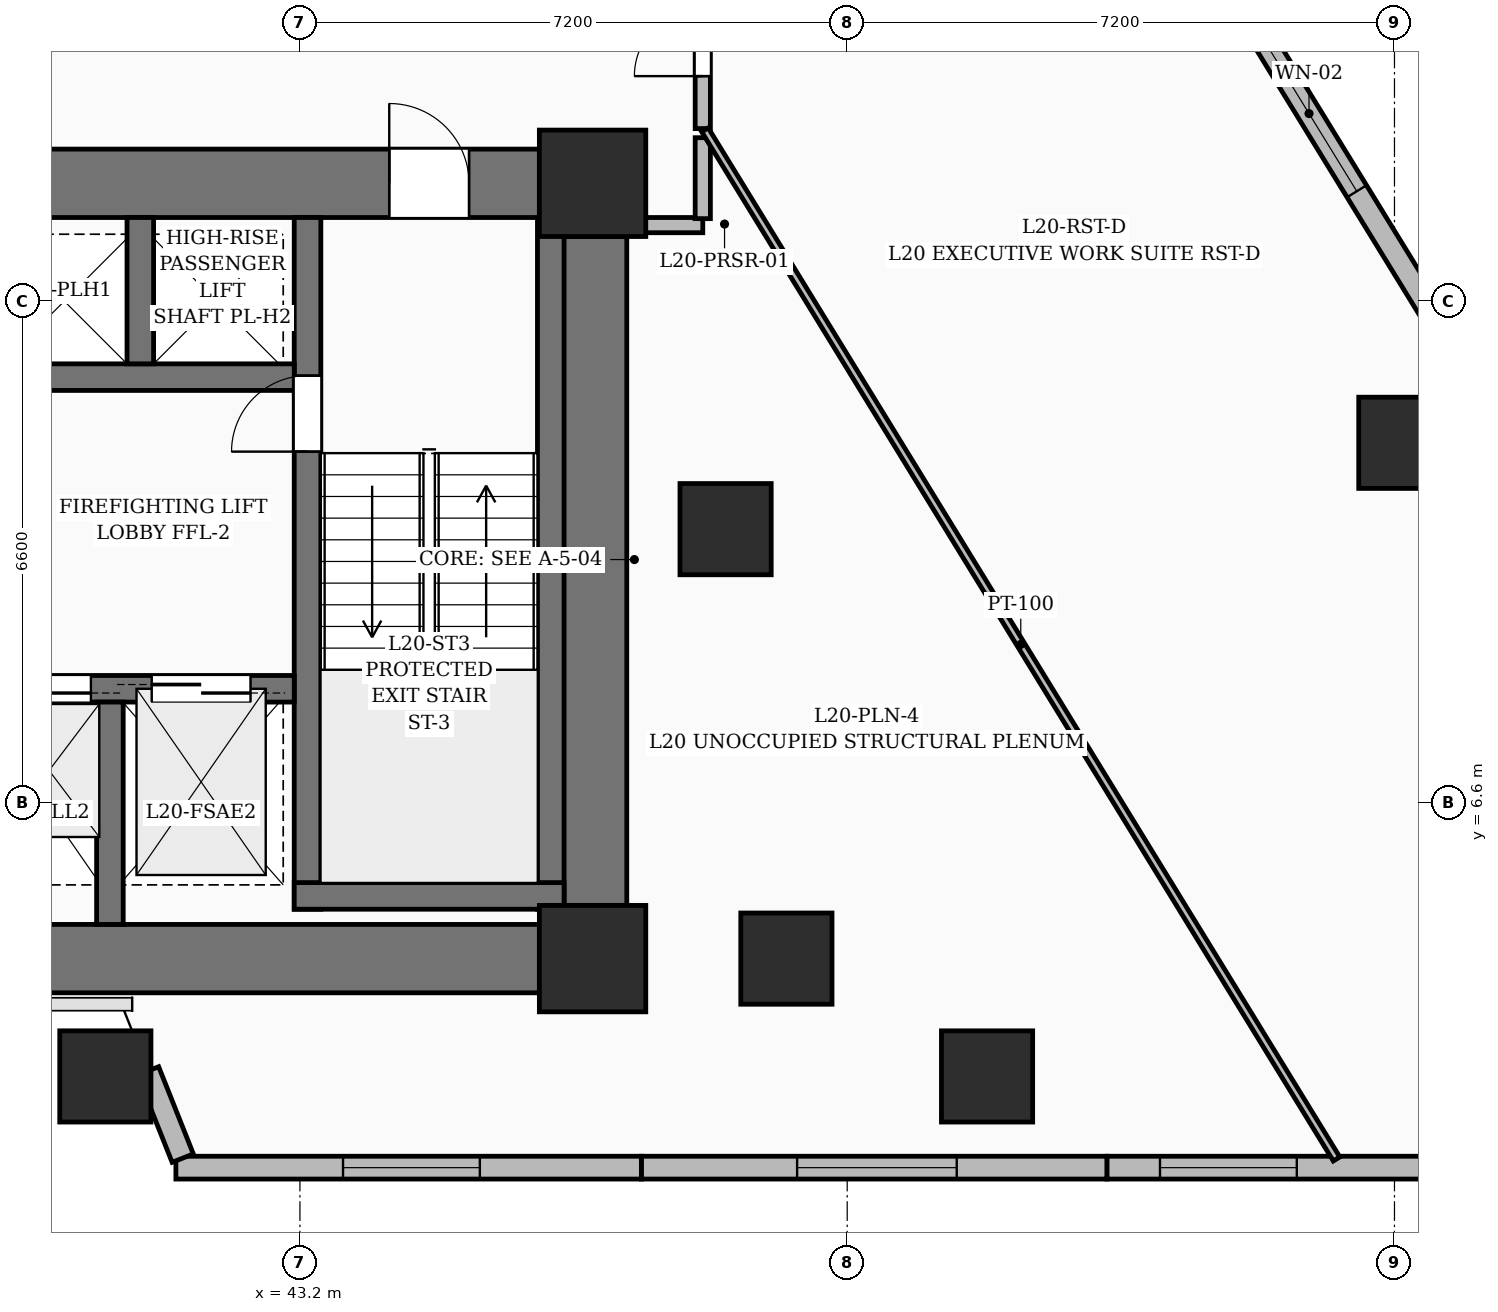
"""IFC4 building model, lengths in metres.
Left out: names, types, materials, properties, quantities, classifications, styles, units other than length and angle.
Written with IfcOpenShell. Run it as: python <this file> out.ifc"""

import sys

from ifc_helpers import new_model, si_unit, direction, frame, frame_2d, origin, origin_2d, place, context, subcontext, project, spatial, rectangle, extrude, element, fill, save


model = new_model("IFC4")
c1 = context("Model", 3, precision=1e-05, world=origin(), true_north=direction((0.0, 1.0)))
c2 = subcontext(c1, "Body", "Model", "MODEL_VIEW")
j1 = project(units=[si_unit("LENGTHUNIT", "METRE"), si_unit("PLANEANGLEUNIT", "RADIAN")], contexts=[c1])
p1 = place(None, origin())
s1 = spatial("IfcSite", under=j1, at=p1, CompositionType="ELEMENT")
p2 = place(p1, origin())
s2 = spatial("IfcBuilding", under=s1, at=p2, CompositionType="ELEMENT")
p3 = place(p2, frame((0.0, 0.0, 82.2)))
s3 = spatial("IfcBuildingStorey", under=s2, at=p3, CompositionType="ELEMENT", Elevation=82.2)
for number, where, z_axis, x_axis in (
    (1, (47.05, 4.55, 0.0), (0.0, 0.0, 1.0), (1.0, 0.0, 0.0)),
    (2, (47.05, 14.75, 0.0), (0.0, 0.0, 1.0), (1.0, 0.0, 0.0)),
):
    element("IfcColumn", number, at=place(p3, frame(where, z_axis=z_axis, x_axis=x_axis)), inside=s3, PredefinedType="COLUMN", context=c2, shape_type="SweptSolid", body=[
        extrude(rectangle(XDim=1.4, YDim=1.4, at=origin_2d()), origin(), (0.0, 0.0, 1.0), 3.6),
    ])
for number, where, z_axis, x_axis in (
    (3, (49.6, 4.55, 0.0), (0.0, 0.0, 1.0), (1.0, 0.0, 0.0)),
    (4, (48.8, 10.2, 0.0), (0.0, 0.0, 1.0), (1.0, 0.0, 0.0)),
):
    element("IfcColumn", number, at=place(p3, frame(where, z_axis=z_axis, x_axis=x_axis)), inside=s3, PredefinedType="COLUMN", context=c2, shape_type="SweptSolid", body=[
        extrude(rectangle(XDim=1.2, YDim=1.2, at=origin_2d()), origin(), (0.0, 0.0, 1.0), 3.6),
    ])
p4 = place(p3, frame((35.85, 4.55, 0.0), z_axis=(0.0, 0.0, 1.0), x_axis=(1.0, 0.0, 0.0)))
e5 = element("IfcWall", 5, at=p4, inside=s3, PredefinedType="SHEAR", context=c2, shape_type="SweptSolid", body=[
    extrude(rectangle(XDim=10.5, YDim=0.9, at=frame_2d((5.25, 0.0))), origin(), (0.0, 0.0, 1.0), 3.6),
])
p5 = place(p3, frame((35.85, 14.75, 0.0), z_axis=(0.0, 0.0, 1.0), x_axis=(1.0, 0.0, 0.0)))
e6 = element("IfcWall", 6, at=p5, inside=s3, PredefinedType="SHEAR", context=c2, shape_type="SweptSolid", body=[
    extrude(rectangle(XDim=10.5, YDim=0.9, at=frame_2d((5.25, 0.0))), origin(), (0.0, 0.0, 1.0), 3.6),
])
p6 = place(p5, frame((0.925, 0.0, 0.0)))
e7 = element("IfcOpeningElement", 7, at=p6, cuts=e6, PredefinedType="OPENING", context=c2, shape_type="SweptSolid", body=[
    extrude(rectangle(XDim=1.05, YDim=2.15, at=frame_2d((0.525, 1.075))), frame((0.0, 0.46, 0.0), z_axis=(0.0, -1.0, 0.0), x_axis=(1.0, 0.0, 0.0)), (0.0, 0.0, 1.0), 0.92),
])
p7 = place(p5, frame((8.525, 0.0, 0.0)))
e8 = element("IfcOpeningElement", 8, at=p7, cuts=e6, PredefinedType="OPENING", context=c2, shape_type="SweptSolid", body=[
    extrude(rectangle(XDim=1.05, YDim=2.15, at=frame_2d((0.525, 1.075))), frame((0.0, 0.46, 0.0), z_axis=(0.0, -1.0, 0.0), x_axis=(1.0, 0.0, 0.0)), (0.0, 0.0, 1.0), 0.92),
])
p8 = place(p3, frame((47.05, 5.25, 0.0), z_axis=(0.0, 0.0, 1.0), x_axis=(0.0, 1.0, 0.0)))
e9 = element("IfcWall", 9, at=p8, inside=s3, PredefinedType="SHEAR", context=c2, shape_type="SweptSolid", body=[
    extrude(rectangle(XDim=8.8, YDim=0.9, at=frame_2d((4.4, 0.0))), origin(), (0.0, 0.0, 1.0), 3.6),
])
p9 = place(p3, frame((43.3, 5.2, 0.0), z_axis=(0.0, 0.0, 1.0), x_axis=(0.0, 1.0, 0.0)))
e10 = element("IfcWall", 10, at=p9, inside=s3, PredefinedType="SOLIDWALL", context=c2, shape_type="SweptSolid", body=[
    extrude(rectangle(XDim=9.1, YDim=0.35, at=frame_2d((4.55, 0.0))), origin(), (0.0, 0.0, 1.0), 3.6),
])
p10 = place(p9, frame((6.02, 0.0, 0.0)))
e11 = element("IfcOpeningElement", 11, at=p10, cuts=e10, PredefinedType="OPENING", context=c2, shape_type="SweptSolid", body=[
    extrude(rectangle(XDim=1.0, YDim=2.15, at=frame_2d((0.5, 1.075))), frame((0.0, 0.185, 0.0), z_axis=(0.0, -1.0, 0.0), x_axis=(1.0, 0.0, 0.0)), (0.0, 0.0, 1.0), 0.37),
])
p11 = place(p3, frame((46.5, 5.2, 0.0), z_axis=(0.0, 0.0, 1.0), x_axis=(0.0, 1.0, 0.0)))
e12 = element("IfcWall", 12, at=p11, inside=s3, PredefinedType="SOLIDWALL", context=c2, shape_type="SweptSolid", body=[
    extrude(rectangle(XDim=9.1, YDim=0.35, at=frame_2d((4.55, 0.0))), origin(), (0.0, 0.0, 1.0), 3.6),
])
p12 = place(p3, frame((43.125, 5.375, 0.0), z_axis=(0.0, 0.0, 1.0), x_axis=(1.0, 0.0, 0.0)))
e13 = element("IfcWall", 13, at=p12, inside=s3, PredefinedType="SOLIDWALL", context=c2, shape_type="SweptSolid", body=[
    extrude(rectangle(XDim=3.55, YDim=0.35, at=frame_2d((1.775, 0.0))), origin(), (0.0, 0.0, 1.0), 3.6),
])
p13 = place(p3, frame((39.075, 8.1, 0.0), z_axis=(0.0, 0.0, 1.0), x_axis=(1.0, 0.0, 0.0)))
e14 = element("IfcWall", 14, at=p13, inside=s3, PredefinedType="SOLIDWALL", context=c2, shape_type="SweptSolid", body=[
    extrude(rectangle(XDim=4.05, YDim=0.35, at=frame_2d((2.025, 0.0))), origin(), (0.0, 0.0, 1.0), 3.6),
])
p14 = place(p13, frame((2.175, 0.0, 0.0)))
e15 = element("IfcOpeningElement", 15, at=p14, cuts=e14, PredefinedType="OPENING", context=c2, shape_type="SweptSolid", body=[
    extrude(rectangle(XDim=1.3, YDim=2.25, at=frame_2d((0.65, 1.125))), frame((0.0, 0.185, 0.0), z_axis=(0.0, -1.0, 0.0), x_axis=(1.0, 0.0, 0.0)), (0.0, 0.0, 1.0), 0.37),
])
p15 = place(p13, frame((0.275, 0.0, 0.0)))
e16 = element("IfcOpeningElement", 16, at=p15, cuts=e14, PredefinedType="OPENING", context=c2, shape_type="SweptSolid", body=[
    extrude(rectangle(XDim=1.1, YDim=2.2, at=frame_2d((0.55, 1.1))), frame((0.0, 0.185, 0.0), z_axis=(0.0, -1.0, 0.0), x_axis=(1.0, 0.0, 0.0)), (0.0, 0.0, 1.0), 0.37),
])
p16 = place(p3, frame((40.7, 5.0, 0.0), z_axis=(0.0, 0.0, 1.0), x_axis=(0.0, 1.0, 0.0)))
e17 = element("IfcWall", 17, at=p16, inside=s3, PredefinedType="SOLIDWALL", context=c2, shape_type="SweptSolid", body=[
    extrude(rectangle(XDim=2.925, YDim=0.35, at=frame_2d((1.462, 0.0))), origin(), (0.0, 0.0, 1.0), 3.6),
])
p17 = place(p3, frame((39.075, 12.2, 0.0), z_axis=(0.0, 0.0, 1.0), x_axis=(1.0, 0.0, 0.0)))
e18 = element("IfcWall", 18, at=p17, inside=s3, PredefinedType="SOLIDWALL", context=c2, shape_type="SweptSolid", body=[
    extrude(rectangle(XDim=4.05, YDim=0.35, at=frame_2d((2.025, 0.0))), origin(), (0.0, 0.0, 1.0), 3.6),
])
p18 = place(p3, frame((41.1, 12.375, 0.0), z_axis=(0.0, 0.0, 1.0), x_axis=(0.0, 1.0, 0.0)))
e19 = element("IfcWall", 19, at=p18, inside=s3, PredefinedType="SOLIDWALL", context=c2, shape_type="SweptSolid", body=[
    extrude(rectangle(XDim=1.925, YDim=0.35, at=frame_2d((0.962, 0.0))), origin(), (0.0, 0.0, 1.0), 3.6),
])
for number, where, z_axis, x_axis in (
    (20, (40.64, 3.0, 0.0), (0.0, 0.0, 1.0), (1.0, 0.0, 0.0)),
    (21, (52.24, 3.0, 0.0), (0.0, 0.0, 1.0), (1.0, 0.0, 0.0)),
    (22, (57.73, 11.336, 0.0), (0.0, 0.0, 1.0), (1.0, 0.0, 0.0)),
):
    element("IfcColumn", number, at=place(p3, frame(where, z_axis=z_axis, x_axis=x_axis)), inside=s3, PredefinedType="COLUMN", context=c2, shape_type="SweptSolid", body=[
        extrude(rectangle(XDim=1.2, YDim=1.2, at=origin_2d()), origin(), (0.0, 0.0, 1.0), 3.6),
    ])
p19 = place(p3, frame((54.041, 19.629, 0.0), z_axis=(0.0, 0.0, 1.0), x_axis=(0.523661280051, -0.851926560083, 0.0)))
e23 = element("IfcWall", 23, at=p19, inside=s3, PredefinedType="SOLIDWALL", context=c2, shape_type="SweptSolid", body=[
    extrude(rectangle(XDim=7.934, YDim=0.3, at=frame_2d((3.967, 0.0))), origin(), (0.0, 0.0, 1.0), 3.35),
])
p20 = place(p19, frame((3.45, 0.0, 0.6)))
e24 = element("IfcOpeningElement", 24, at=p20, cuts=e23, PredefinedType="OPENING", context=c2, shape_type="SweptSolid", body=[
    extrude(rectangle(XDim=2.4, YDim=2.1, at=frame_2d((1.2, 1.05))), frame((0.0, 0.16, 0.0), z_axis=(0.0, -1.0, 0.0), x_axis=(1.0, 0.0, 0.0)), (0.0, 0.0, 1.0), 0.32),
])
p21 = place(p3, frame((59.34, 1.8, 0.0), z_axis=(0.0, 0.0, 1.0), x_axis=(-1.0, 0.0, 0.0)))
e25 = element("IfcWall", 25, at=p21, inside=s3, PredefinedType="SOLIDWALL", context=c2, shape_type="SweptSolid", body=[
    extrude(rectangle(XDim=5.524, YDim=0.3, at=frame_2d((2.762, 0.0))), origin(), (0.0, 0.0, 1.0), 3.35),
])
p22 = place(p21, frame((3.025, 0.0, 0.6)))
e26 = element("IfcOpeningElement", 26, at=p22, cuts=e25, PredefinedType="OPENING", context=c2, shape_type="SweptSolid", body=[
    extrude(rectangle(XDim=1.8, YDim=2.1, at=frame_2d((0.9, 1.05))), frame((0.0, 0.16, 0.0), z_axis=(0.0, -1.0, 0.0), x_axis=(1.0, 0.0, 0.0)), (0.0, 0.0, 1.0), 0.32),
])
p23 = place(p3, frame((53.816, 1.8, 0.0), z_axis=(0.0, 0.0, 1.0), x_axis=(-1.0, 0.0, 0.0)))
e27 = element("IfcWall", 27, at=p23, inside=s3, PredefinedType="SOLIDWALL", context=c2, shape_type="SweptSolid", body=[
    extrude(rectangle(XDim=6.124, YDim=0.3, at=frame_2d((3.062, 0.0))), origin(), (0.0, 0.0, 1.0), 3.35),
])
p24 = place(p23, frame((1.975, 0.0, 0.55)))
e28 = element("IfcOpeningElement", 28, at=p24, cuts=e27, PredefinedType="OPENING", context=c2, shape_type="SweptSolid", body=[
    extrude(rectangle(XDim=2.1, YDim=2.4, at=frame_2d((1.05, 1.2))), frame((0.0, 0.16, 0.0), z_axis=(0.0, -1.0, 0.0), x_axis=(1.0, 0.0, 0.0)), (0.0, 0.0, 1.0), 0.32),
])
p25 = place(p3, frame((47.692, 1.8, 0.0), z_axis=(0.0, 0.0, 1.0), x_axis=(-1.0, 0.0, 0.0)))
e29 = element("IfcWall", 29, at=p25, inside=s3, PredefinedType="SOLIDWALL", context=c2, shape_type="SweptSolid", body=[
    extrude(rectangle(XDim=6.124, YDim=0.3, at=frame_2d((3.062, 0.0))), origin(), (0.0, 0.0, 1.0), 3.35),
])
p26 = place(p25, frame((2.125, 0.0, 0.6)))
e30 = element("IfcOpeningElement", 30, at=p26, cuts=e29, PredefinedType="OPENING", context=c2, shape_type="SweptSolid", body=[
    extrude(rectangle(XDim=1.8, YDim=2.1, at=frame_2d((0.9, 1.05))), frame((0.0, 0.16, 0.0), z_axis=(0.0, -1.0, 0.0), x_axis=(1.0, 0.0, 0.0)), (0.0, 0.0, 1.0), 0.32),
])
p27 = place(p3, frame((41.658, 1.925, 0.0), z_axis=(0.0, 0.0, 1.0), x_axis=(-0.369583004586, 0.929197719929, 0.0)))
e31 = element("IfcWall", 31, at=p27, inside=s3, PredefinedType="SOLIDWALL", context=c2, shape_type="SweptSolid", body=[
    extrude(rectangle(XDim=1.235, YDim=0.3, at=frame_2d((0.617, 0.0))), origin(), (0.0, 0.0, 1.0), 2.375),
])
p28 = place(p3, frame((47.5, 14.2, 0.0), z_axis=(0.0, 0.0, 1.0), x_axis=(1.0, 0.0, 0.0)))
e32 = element("IfcWall", 32, at=p28, inside=s3, PredefinedType="PARTITIONING", context=c2, shape_type="SweptSolid", body=[
    extrude(rectangle(XDim=1.0, YDim=0.2, at=frame_2d((0.5, 0.0))), origin(), (0.0, 0.0, 1.0), 3.35),
])
p29 = place(p3, frame((48.5, 14.285, 0.0), z_axis=(0.0, 0.0, 1.0), x_axis=(0.0, 1.0, 0.0)))
e33 = element("IfcWall", 33, at=p29, inside=s3, PredefinedType="PARTITIONING", context=c2, shape_type="SweptSolid", body=[
    extrude(rectangle(XDim=1.065, YDim=0.2, at=frame_2d((0.533, 0.0))), origin(), (0.0, 0.0, 1.0), 3.35),
])
p30 = place(p3, frame((48.5, 15.47, 0.0), z_axis=(0.0, 0.0, 1.0), x_axis=(0.0, 1.0, 0.0)))
e34 = element("IfcWall", 34, at=p30, inside=s3, PredefinedType="PARTITIONING", context=c2, shape_type="SweptSolid", body=[
    extrude(rectangle(XDim=2.28, YDim=0.2, at=frame_2d((1.14, 0.0))), origin(), (0.0, 0.0, 1.0), 2.345),
])
p31 = place(p30, frame((0.69, 0.0, 0.0)))
e35 = element("IfcOpeningElement", 35, at=p31, cuts=e34, PredefinedType="OPENING", context=c2, shape_type="SweptSolid", body=[
    extrude(rectangle(XDim=0.9, YDim=2.1, at=frame_2d((0.45, 1.05))), frame((0.0, 0.11, 0.0), z_axis=(0.0, -1.0, 0.0), x_axis=(1.0, 0.0, 0.0)), (0.0, 0.0, 1.0), 0.22),
])
p32 = place(p3, frame((48.529, 15.453, 0.0), z_axis=(0.0, 0.0, 1.0), x_axis=(0.52306290803, -0.852294077325, 0.0)))
e36 = element("IfcWall", 36, at=p32, inside=s3, PredefinedType="PARTITIONING", context=c2, shape_type="SweptSolid", body=[
    extrude(rectangle(XDim=15.885, YDim=0.1, at=frame_2d((7.943, 0.0))), origin(), (0.0, 0.0, 1.0), 2.345),
])
p33 = place(p20, origin())
e37 = element("IfcWindow", 37, at=p33, inside=s3, PartitioningType="SINGLE_PANEL", PredefinedType="WINDOW", context=c2, shape_type="SweptSolid", body=[
    extrude(rectangle(XDim=2.4, YDim=2.1, at=frame_2d((1.2, 1.05))), frame((0.0, 0.03, 0.0), z_axis=(0.0, -1.0, 0.0), x_axis=(1.0, 0.0, 0.0)), (0.0, 0.0, 1.0), 0.06),
])
fill(e24, e37)
p34 = place(p22, origin())
e38 = element("IfcWindow", 38, at=p34, inside=s3, PartitioningType="SINGLE_PANEL", PredefinedType="WINDOW", context=c2, shape_type="SweptSolid", body=[
    extrude(rectangle(XDim=1.8, YDim=2.1, at=frame_2d((0.9, 1.05))), frame((0.0, 0.03, 0.0), z_axis=(0.0, -1.0, 0.0), x_axis=(1.0, 0.0, 0.0)), (0.0, 0.0, 1.0), 0.06),
])
fill(e26, e38)
p35 = place(p24, origin())
e39 = element("IfcWindow", 39, at=p35, inside=s3, PartitioningType="SINGLE_PANEL", PredefinedType="WINDOW", context=c2, shape_type="SweptSolid", body=[
    extrude(rectangle(XDim=2.1, YDim=2.4, at=frame_2d((1.05, 1.2))), frame((0.0, 0.03, 0.0), z_axis=(0.0, -1.0, 0.0), x_axis=(1.0, 0.0, 0.0)), (0.0, 0.0, 1.0), 0.06),
])
fill(e28, e39)
p36 = place(p26, origin())
e40 = element("IfcWindow", 40, at=p36, inside=s3, PartitioningType="SINGLE_PANEL", PredefinedType="WINDOW", context=c2, shape_type="SweptSolid", body=[
    extrude(rectangle(XDim=1.8, YDim=2.1, at=frame_2d((0.9, 1.05))), frame((0.0, 0.03, 0.0), z_axis=(0.0, -1.0, 0.0), x_axis=(1.0, 0.0, 0.0)), (0.0, 0.0, 1.0), 0.06),
])
fill(e30, e40)
p37 = place(p7, origin())
e41 = element("IfcDoor", 41, at=p37, inside=s3, OperationType="SINGLE_SWING_LEFT", PredefinedType="DOOR", context=c2, shape_type="SweptSolid", body=[
    extrude(rectangle(XDim=1.05, YDim=2.15, at=frame_2d((0.525, 1.075))), frame((0.0, 0.025, 0.0), z_axis=(0.0, -1.0, 0.0), x_axis=(1.0, 0.0, 0.0)), (0.0, 0.0, 1.0), 0.05),
])
fill(e8, e41)
p38 = place(p10, origin())
e42 = element("IfcDoor", 42, at=p38, inside=s3, OperationType="SINGLE_SWING_LEFT", PredefinedType="DOOR", context=c2, shape_type="SweptSolid", body=[
    extrude(rectangle(XDim=1.0, YDim=2.15, at=frame_2d((0.5, 1.075))), frame((0.0, 0.025, 0.0), z_axis=(0.0, -1.0, 0.0), x_axis=(1.0, 0.0, 0.0)), (0.0, 0.0, 1.0), 0.05),
])
fill(e11, e42)
p39 = place(p14, origin())
e43 = element("IfcDoor", 43, at=p39, inside=s3, OperationType="DOUBLE_DOOR_SLIDING", PredefinedType="DOOR", context=c2, shape_type="SweptSolid", body=[
    extrude(rectangle(XDim=1.3, YDim=2.25, at=frame_2d((0.65, 1.125))), frame((0.0, 0.025, 0.0), z_axis=(0.0, -1.0, 0.0), x_axis=(1.0, 0.0, 0.0)), (0.0, 0.0, 1.0), 0.05),
])
fill(e15, e43)
p40 = place(p15, origin())
e44 = element("IfcDoor", 44, at=p40, inside=s3, OperationType="DOUBLE_DOOR_SLIDING", PredefinedType="DOOR", context=c2, shape_type="SweptSolid", body=[
    extrude(rectangle(XDim=1.1, YDim=2.2, at=frame_2d((0.55, 1.1))), frame((0.0, 0.025, 0.0), z_axis=(0.0, -1.0, 0.0), x_axis=(1.0, 0.0, 0.0)), (0.0, 0.0, 1.0), 0.05),
])
fill(e16, e44)
p41 = place(p31, origin())
e45 = element("IfcDoor", 45, at=p41, inside=s3, OperationType="SINGLE_SWING_LEFT", PredefinedType="DOOR", context=c2, shape_type="SweptSolid", body=[
    extrude(rectangle(XDim=0.9, YDim=2.1, at=frame_2d((0.45, 1.05))), frame((0.0, 0.025, 0.0), z_axis=(0.0, -1.0, 0.0), x_axis=(1.0, 0.0, 0.0)), (0.0, 0.0, 1.0), 0.05),
])
fill(e35, e45)
save(model, sys.argv[1])
